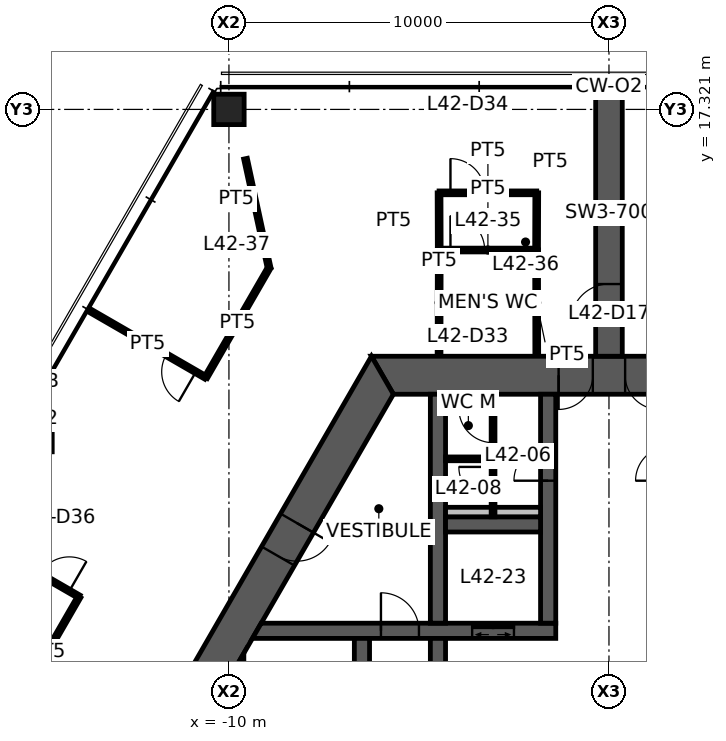
"""IFC4 building model, lengths in metres.
Left out: names, types, materials, properties, quantities, classifications, styles, units other than length and angle.
Written with IfcOpenShell. Run it as: python <this file> out.ifc"""

import sys

from ifc_helpers import new_model, si_unit, direction, frame, frame_2d, origin, origin_2d, place, context, subcontext, project, spatial, polyline, rectangle, hollow_rectangle, outline, extrude, element, fill, save


model = new_model("IFC4")
c1 = context("Model", 3, precision=1e-05, world=origin(), true_north=direction((0.0, 1.0)))
c2 = subcontext(c1, "Body", "Model", "MODEL_VIEW")
j1 = project(units=[si_unit("LENGTHUNIT", "METRE"), si_unit("PLANEANGLEUNIT", "RADIAN")], contexts=[c1])
p1 = place(None, origin())
s1 = spatial("IfcSite", under=j1, at=p1, CompositionType="ELEMENT")
p2 = place(p1, origin())
s2 = spatial("IfcBuilding", under=s1, at=p2, CompositionType="ELEMENT")
p3 = place(p2, frame((0.0, 0.0, 168.2)))
s3 = spatial("IfcBuildingStorey", under=s2, at=p3, CompositionType="ELEMENT", Elevation=168.2)
p4 = place(p3, frame((-10.0, 17.321, 0.0), z_axis=(0.0, 0.0, 1.0), x_axis=(1.0, 0.0, 0.0)))
e1 = element("IfcColumn", 1, at=p4, inside=s3, PredefinedType="COLUMN", context=c2, shape_type="SweptSolid", body=[
    extrude(hollow_rectangle(XDim=0.8, YDim=0.8, WallThickness=0.045, at=origin_2d()), origin(), (0.0, 0.0, 1.0), 3.9),
])
p5 = place(p3, frame((5.961, 10.325, 0.0), z_axis=(0.0, 0.0, 1.0), x_axis=(-1.0, 0.0, 0.0)))
e2 = element("IfcWall", 2, at=p5, inside=s3, PredefinedType="SHEAR", context=c2, shape_type="SweptSolid", body=[
    extrude(outline(polyline([(-0.289, -0.5), (4.636, -0.5), (5.536, -0.5), (6.386, -0.5), (7.286, -0.5), (12.211, -0.5), (11.634, 0.5), (7.286, 0.5), (6.386, 0.5), (5.536, 0.5), (4.636, 0.5), (0.289, 0.5), (-0.289, -0.5)])), origin(), (0.0, 0.0, 1.0), 3.9),
])
p6 = place(p5, frame((6.386, 0.0, 0.0)))
e3 = element("IfcOpeningElement", 3, at=p6, cuts=e2, PredefinedType="OPENING", context=c2, shape_type="SweptSolid", body=[
    extrude(rectangle(XDim=0.9, YDim=2.1, at=frame_2d((0.45, 1.05))), frame((0.0, 0.51, 0.0), z_axis=(0.0, -1.0, 0.0), x_axis=(1.0, 0.0, 0.0)), (0.0, 0.0, 1.0), 1.02),
])
p7 = place(p5, frame((4.636, 0.0, 0.0)))
e4 = element("IfcOpeningElement", 4, at=p7, cuts=e2, PredefinedType="OPENING", context=c2, shape_type="SweptSolid", body=[
    extrude(rectangle(XDim=0.9, YDim=2.1, at=frame_2d((0.45, 1.05))), frame((0.0, 0.51, 0.0), z_axis=(0.0, -1.0, 0.0), x_axis=(1.0, 0.0, 0.0)), (0.0, 0.0, 1.0), 1.02),
])
p8 = place(p3, frame((-5.961, 10.325, 0.0), z_axis=(0.0, 0.0, 1.0), x_axis=(-0.500004296715, -0.866022923061, 0.0)))
e5 = element("IfcWall", 5, at=p8, inside=s3, PredefinedType="SHEAR", context=c2, shape_type="SweptSolid", body=[
    extrude(outline(polyline([(-0.289, -0.5), (4.494, -0.5), (5.494, -0.5), (12.211, -0.5), (11.634, 0.5), (5.494, 0.5), (4.494, 0.5), (0.289, 0.5), (-0.289, -0.5)])), origin(), (0.0, 0.0, 1.0), 3.9),
])
p9 = place(p8, frame((4.494, 0.0, 0.0)))
e6 = element("IfcOpeningElement", 6, at=p9, cuts=e5, PredefinedType="OPENING", context=c2, shape_type="SweptSolid", body=[
    extrude(rectangle(XDim=1.0, YDim=2.1, at=frame_2d((0.5, 1.05))), frame((0.0, 0.51, 0.0), z_axis=(0.0, -1.0, 0.0), x_axis=(1.0, 0.0, 0.0)), (0.0, 0.0, 1.0), 1.02),
])
p10 = place(p3, frame((0.0, 10.825, 0.0), z_axis=(0.0, 0.0, 1.0), x_axis=(0.0, 1.0, 0.0)))
e7 = element("IfcWall", 7, at=p10, inside=s3, PredefinedType="SHEAR", context=c2, shape_type="SweptSolid", body=[
    extrude(rectangle(XDim=6.946, YDim=0.7, at=frame_2d((3.473, 0.0))), origin(), (0.0, 0.0, 1.0), 3.9),
])
p11 = place(p10, frame((0.9, 0.0, 0.0)))
e8 = element("IfcOpeningElement", 8, at=p11, cuts=e7, PredefinedType="OPENING", context=c2, shape_type="SweptSolid", body=[
    extrude(rectangle(XDim=1.0, YDim=2.1, at=frame_2d((0.5, 1.05))), frame((0.0, 0.36, 0.0), z_axis=(0.0, -1.0, 0.0), x_axis=(1.0, 0.0, 0.0)), (0.0, 0.0, 1.0), 0.72),
])
p12 = place(p3, frame((-9.266, 3.6, 0.0), z_axis=(0.0, 0.0, 1.0), x_axis=(1.0, 0.0, 0.0)))
e9 = element("IfcWall", 9, at=p12, inside=s3, PredefinedType="SHEAR", context=c2, shape_type="SweptSolid", body=[
    extrude(outline(polyline([(-0.115, -0.2), (3.266, -0.2), (4.266, -0.2), (5.667, -0.2), (6.767, -0.2), (7.866, -0.2), (7.866, 0.2), (6.767, 0.2), (5.667, 0.2), (4.266, 0.2), (3.266, 0.2), (0.115, 0.2), (-0.115, -0.2)])), origin(), (0.0, 0.0, 1.0), 3.9),
])
p13 = place(p12, frame((3.266, 0.0, 0.0)))
e10 = element("IfcOpeningElement", 10, at=p13, cuts=e9, PredefinedType="OPENING", context=c2, shape_type="SweptSolid", body=[
    extrude(rectangle(XDim=1.0, YDim=2.1, at=frame_2d((0.5, 1.05))), frame((0.0, 0.21, 0.0), z_axis=(0.0, -1.0, 0.0), x_axis=(1.0, 0.0, 0.0)), (0.0, 0.0, 1.0), 0.42),
])
p14 = place(p12, frame((5.667, 0.0, 0.0)))
e11 = element("IfcOpeningElement", 11, at=p14, cuts=e9, PredefinedType="OPENING", context=c2, shape_type="SweptSolid", body=[
    extrude(rectangle(XDim=1.1, YDim=2.1, at=frame_2d((0.55, 1.05))), frame((0.0, 0.21, 0.0), z_axis=(0.0, -1.0, 0.0), x_axis=(1.0, 0.0, 0.0)), (0.0, 0.0, 1.0), 0.42),
])
p15 = place(p3, frame((-1.6, 3.8, 0.0), z_axis=(0.0, 0.0, 1.0), x_axis=(0.0, 1.0, 0.0)))
e12 = element("IfcWall", 12, at=p15, inside=s3, PredefinedType="SHEAR", context=c2, shape_type="SweptSolid", body=[
    extrude(rectangle(XDim=6.025, YDim=0.4, at=frame_2d((3.012, 0.0))), origin(), (0.0, 0.0, 1.0), 3.9),
])
p16 = place(p15, frame((3.75, 0.0, 0.0)))
e13 = element("IfcOpeningElement", 13, at=p16, cuts=e12, PredefinedType="OPENING", context=c2, shape_type="SweptSolid", body=[
    extrude(rectangle(XDim=0.9, YDim=2.1, at=frame_2d((0.45, 1.05))), frame((0.0, 0.21, 0.0), z_axis=(0.0, -1.0, 0.0), x_axis=(1.0, 0.0, 0.0)), (0.0, 0.0, 1.0), 0.42),
])
p17 = place(p3, frame((-4.5, -3.4, 0.0), z_axis=(0.0, 0.0, 1.0), x_axis=(0.0, 1.0, 0.0)))
e14 = element("IfcWall", 14, at=p17, inside=s3, PredefinedType="SHEAR", context=c2, shape_type="SweptSolid", body=[
    extrude(rectangle(XDim=6.8, YDim=0.4, at=frame_2d((3.4, 0.0))), origin(), (0.0, 0.0, 1.0), 3.9),
])
p18 = place(p17, frame((2.9, 0.0, 0.0)))
e15 = element("IfcOpeningElement", 15, at=p18, cuts=e14, PredefinedType="OPENING", context=c2, shape_type="SweptSolid", body=[
    extrude(rectangle(XDim=1.0, YDim=2.1, at=frame_2d((0.5, 1.05))), frame((0.0, 0.21, 0.0), z_axis=(0.0, -1.0, 0.0), x_axis=(1.0, 0.0, 0.0)), (0.0, 0.0, 1.0), 0.42),
])
p19 = place(p3, frame((-6.5, -3.4, 0.0), z_axis=(0.0, 0.0, 1.0), x_axis=(0.0, 1.0, 0.0)))
e16 = element("IfcWall", 16, at=p19, inside=s3, PredefinedType="SHEAR", context=c2, shape_type="SweptSolid", body=[
    extrude(rectangle(XDim=6.8, YDim=0.4, at=frame_2d((3.4, 0.0))), origin(), (0.0, 0.0, 1.0), 3.9),
])
p20 = place(p19, frame((0.1, 0.0, 0.0)))
e17 = element("IfcOpeningElement", 17, at=p20, cuts=e16, PredefinedType="OPENING", context=c2, shape_type="SweptSolid", body=[
    extrude(rectangle(XDim=1.0, YDim=2.1, at=frame_2d((0.5, 1.05))), frame((0.0, 0.21, 0.0), z_axis=(0.0, -1.0, 0.0), x_axis=(1.0, 0.0, 0.0)), (0.0, 0.0, 1.0), 0.42),
])
p21 = place(p3, frame((-4.5, 3.8, 0.0), z_axis=(0.0, 0.0, 1.0), x_axis=(0.0, 1.0, 0.0)))
e18 = element("IfcWall", 18, at=p21, inside=s3, PredefinedType="SHEAR", context=c2, shape_type="SweptSolid", body=[
    extrude(rectangle(XDim=6.025, YDim=0.4, at=frame_2d((3.012, 0.0))), origin(), (0.0, 0.0, 1.0), 3.9),
])
p22 = place(p3, frame((-4.3, 6.4, 0.0), z_axis=(0.0, 0.0, 1.0), x_axis=(1.0, 0.0, 0.0)))
e19 = element("IfcWall", 19, at=p22, inside=s3, PredefinedType="SHEAR", context=c2, shape_type="SweptSolid", body=[
    extrude(rectangle(XDim=2.5, YDim=0.4, at=frame_2d((1.25, 0.0))), origin(), (0.0, 0.0, 1.0), 3.9),
])
p23 = place(p3, frame((-9.808, -2.662, 0.0), z_axis=(0.0, 0.0, 1.0), x_axis=(0.0, 1.0, 0.0)))
e20 = element("IfcWall", 20, at=p23, inside=s3, PredefinedType="SHEAR", context=c2, shape_type="SweptSolid", body=[
    extrude(outline(polyline([(-0.346, -0.2), (5.671, -0.2), (4.978, 0.2), (0.346, 0.2), (-0.346, -0.2)])), origin(), (0.0, 0.0, 1.0), 3.9),
])
p24 = place(p3, frame((-4.3, 6.725, 0.0), z_axis=(0.0, 0.0, 1.0), x_axis=(1.0, 0.0, 0.0)))
e21 = element("IfcWall", 21, at=p24, inside=s3, PredefinedType="PLUMBINGWALL", context=c2, shape_type="SweptSolid", body=[
    extrude(rectangle(XDim=2.5, YDim=0.25, at=frame_2d((1.25, 0.0))), origin(), (0.0, 0.0, 1.0), 3.9),
])
p25 = place(p3, frame((-3.05, 6.6, 0.0), z_axis=(0.0, 0.0, 1.0), x_axis=(0.0, 1.0, 0.0)))
e22 = element("IfcWall", 22, at=p25, inside=s3, PredefinedType="PARTITIONING", context=c2, shape_type="SweptSolid", body=[
    extrude(rectangle(XDim=3.225, YDim=0.1, at=frame_2d((1.612, 0.0))), origin(), (0.0, 0.0, 1.0), 2.95),
])
p26 = place(p25, frame((1.95, 0.0, 0.0)))
e23 = element("IfcOpeningElement", 23, at=p26, cuts=e22, PredefinedType="OPENING", context=c2, shape_type="SweptSolid", body=[
    extrude(rectangle(XDim=0.9, YDim=2.1, at=frame_2d((0.45, 1.05))), frame((0.0, 0.06, 0.0), z_axis=(0.0, -1.0, 0.0), x_axis=(1.0, 0.0, 0.0)), (0.0, 0.0, 1.0), 0.12),
])
p27 = place(p25, frame((0.413, 0.0, 0.0)))
e24 = element("IfcOpeningElement", 24, at=p27, cuts=e22, PredefinedType="OPENING", context=c2, shape_type="SweptSolid", body=[
    extrude(rectangle(XDim=0.9, YDim=2.1, at=frame_2d((0.45, 1.05))), frame((0.0, 0.06, 0.0), z_axis=(0.0, -1.0, 0.0), x_axis=(1.0, 0.0, 0.0)), (0.0, 0.0, 1.0), 0.12),
])
p28 = place(p3, frame((-3.1, 8.125, 0.0), z_axis=(0.0, 0.0, 1.0), x_axis=(-1.0, 0.0, 0.0)))
e25 = element("IfcWall", 25, at=p28, inside=s3, PredefinedType="PARTITIONING", context=c2, shape_type="SweptSolid", body=[
    extrude(rectangle(XDim=1.2, YDim=0.1, at=frame_2d((0.6, 0.0))), origin(), (0.0, 0.0, 1.0), 2.95),
])
p29 = place(p3, frame((-4.471, 13.62, 0.0), z_axis=(0.0, 0.0, 1.0), x_axis=(1.0, 0.0, 0.0)))
e26 = element("IfcWall", 26, at=p29, inside=s3, PredefinedType="PARTITIONING", context=c2, shape_type="SweptSolid", body=[
    extrude(rectangle(XDim=2.571, YDim=0.1, at=frame_2d((1.286, 0.0))), origin(), (0.0, 0.0, 1.0), 2.95),
])
p30 = place(p29, frame((0.3, 0.0, 0.0)))
e27 = element("IfcOpeningElement", 27, at=p30, cuts=e26, PredefinedType="OPENING", context=c2, shape_type="SweptSolid", body=[
    extrude(rectangle(XDim=0.9, YDim=2.1, at=frame_2d((0.45, 1.05))), frame((0.0, 0.06, 0.0), z_axis=(0.0, -1.0, 0.0), x_axis=(1.0, 0.0, 0.0)), (0.0, 0.0, 1.0), 0.12),
])
for number, where, z_axis, x_axis in (
    (28, (-4.471, 10.845, 0.0), (0.0, 0.0, 1.0), (0.002, 1.0, 0.0)),
    (29, (-1.905, 13.625, 0.0), (0.0, 0.0, 1.0), (0.002, -1.0, 0.0)),
):
    element("IfcWall", number, at=place(p3, frame(where, z_axis=z_axis, x_axis=x_axis)), inside=s3, PredefinedType="PARTITIONING", context=c2, shape_type="SweptSolid", body=[
        extrude(rectangle(XDim=2.78, YDim=0.1, at=frame_2d((1.39, 0.0))), origin(), (0.0, 0.0, 1.0), 2.95),
    ])
p31 = place(p3, frame((-4.471, 15.125, 0.0), z_axis=(0.0, 0.0, 1.0), x_axis=(1.0, 0.0, 0.0)))
e30 = element("IfcWall", 30, at=p31, inside=s3, PredefinedType="PARTITIONING", context=c2, shape_type="SweptSolid", body=[
    extrude(rectangle(XDim=2.571, YDim=0.1, at=frame_2d((1.286, 0.0))), origin(), (0.0, 0.0, 1.0), 2.95),
])
p32 = place(p31, frame((0.3, 0.0, 0.0)))
e31 = element("IfcOpeningElement", 31, at=p32, cuts=e30, PredefinedType="OPENING", context=c2, shape_type="SweptSolid", body=[
    extrude(rectangle(XDim=0.9, YDim=2.1, at=frame_2d((0.45, 1.05))), frame((0.0, 0.06, 0.0), z_axis=(0.0, -1.0, 0.0), x_axis=(1.0, 0.0, 0.0)), (0.0, 0.0, 1.0), 0.12),
])
for number, where, z_axis, x_axis in (
    (32, (-4.466, 13.625, 0.0), (0.0, 0.0, 1.0), (-0.003, 1.0, 0.0)),
    (33, (-1.9, 15.125, 0.0), (0.0, 0.0, 1.0), (-0.003, -1.0, 0.0)),
):
    element("IfcWall", number, at=place(p3, frame(where, z_axis=z_axis, x_axis=x_axis)), inside=s3, PredefinedType="PARTITIONING", context=c2, shape_type="SweptSolid", body=[
        extrude(rectangle(XDim=1.5, YDim=0.1, at=frame_2d((0.75, 0.0))), origin(), (0.0, 0.0, 1.0), 2.95),
    ])
p33 = place(p3, frame((-10.61, 10.264, 0.0), z_axis=(0.0, 0.0, 1.0), x_axis=(-0.86601282795, 0.500021781351, 0.0)))
e34 = element("IfcWall", 34, at=p33, inside=s3, PredefinedType="PARTITIONING", context=c2, shape_type="SweptSolid", body=[
    extrude(rectangle(XDim=3.53, YDim=0.1, at=frame_2d((1.765, 0.0))), origin(), (0.0, 0.0, 1.0), 2.95),
])
p34 = place(p33, frame((0.3, 0.0, 0.0)))
e35 = element("IfcOpeningElement", 35, at=p34, cuts=e34, PredefinedType="OPENING", context=c2, shape_type="SweptSolid", body=[
    extrude(rectangle(XDim=0.9, YDim=2.1, at=frame_2d((0.45, 1.05))), frame((0.0, 0.06, 0.0), z_axis=(0.0, -1.0, 0.0), x_axis=(1.0, 0.0, 0.0)), (0.0, 0.0, 1.0), 0.12),
])
p35 = place(p3, frame((-9.564, 16.024, 0.0), z_axis=(0.0, 0.0, 1.0), x_axis=(0.211116290139, -0.977460951669, 0.0)))
e36 = element("IfcWall", 36, at=p35, inside=s3, PredefinedType="PARTITIONING", context=c2, shape_type="SweptSolid", body=[
    extrude(rectangle(XDim=2.941, YDim=0.1, at=frame_2d((1.47, 0.0))), origin(), (0.0, 0.0, 1.0), 2.95),
])
p36 = place(p3, frame((-8.943, 13.149, 0.0), z_axis=(0.0, 0.0, 1.0), x_axis=(-0.500189695295, -0.86591585545, 0.0)))
e37 = element("IfcWall", 37, at=p36, inside=s3, PredefinedType="PARTITIONING", context=c2, shape_type="SweptSolid", body=[
    extrude(rectangle(XDim=3.332, YDim=0.1, at=frame_2d((1.666, 0.0))), origin(), (0.0, 0.0, 1.0), 2.95),
])
p37 = place(p3, frame((-16.976, 6.248, 0.0), z_axis=(0.0, 0.0, 1.0), x_axis=(0.866001150353, -0.500042005822, 0.0)))
e38 = element("IfcWall", 38, at=p37, inside=s3, PredefinedType="PARTITIONING", context=c2, shape_type="SweptSolid", body=[
    extrude(rectangle(XDim=3.505, YDim=0.1, at=frame_2d((1.752, 0.0))), origin(), (0.0, 0.0, 1.0), 2.95),
])
p38 = place(p37, frame((2.305, 0.0, 0.0)))
e39 = element("IfcOpeningElement", 39, at=p38, cuts=e38, PredefinedType="OPENING", context=c2, shape_type="SweptSolid", body=[
    extrude(rectangle(XDim=0.9, YDim=2.1, at=frame_2d((0.45, 1.05))), frame((0.0, 0.06, 0.0), z_axis=(0.0, -1.0, 0.0), x_axis=(1.0, 0.0, 0.0)), (0.0, 0.0, 1.0), 0.12),
])
p39 = place(p3, frame((-13.941, 4.495, 0.0), z_axis=(0.0, 0.0, 1.0), x_axis=(-0.500033344505, -0.86600615147, 0.0)))
e40 = element("IfcWall", 40, at=p39, inside=s3, PredefinedType="PARTITIONING", context=c2, shape_type="SweptSolid", body=[
    extrude(rectangle(XDim=3.331, YDim=0.1, at=frame_2d((1.666, 0.0))), origin(), (0.0, 0.0, 1.0), 2.95),
])
p40 = place(p3, frame((0.0, 17.771, 0.0), z_axis=(0.0, 0.0, 1.0), x_axis=(0.0, 1.0, 0.0)))
e41 = element("IfcWall", 41, at=p40, inside=s3, PredefinedType="PARTITIONING", context=c2, shape_type="SweptSolid", body=[
    extrude(rectangle(XDim=0.08, YDim=0.175, at=frame_2d((0.04, 0.0))), origin(), (0.0, 0.0, 1.0), 3.9),
])
p41 = place(p6, origin())
e42 = element("IfcDoor", 42, at=p41, inside=s3, OperationType="SINGLE_SWING_RIGHT", PredefinedType="DOOR", context=c2, shape_type="SweptSolid", body=[
    extrude(rectangle(XDim=0.9, YDim=2.1, at=frame_2d((0.45, 1.05))), frame((0.0, 0.025, 0.0), z_axis=(0.0, -1.0, 0.0), x_axis=(1.0, 0.0, 0.0)), (0.0, 0.0, 1.0), 0.05),
])
fill(e3, e42)
p42 = place(p7, origin())
e43 = element("IfcDoor", 43, at=p42, inside=s3, OperationType="SINGLE_SWING_LEFT", PredefinedType="DOOR", context=c2, shape_type="SweptSolid", body=[
    extrude(rectangle(XDim=0.9, YDim=2.1, at=frame_2d((0.45, 1.05))), frame((0.0, 0.025, 0.0), z_axis=(0.0, -1.0, 0.0), x_axis=(1.0, 0.0, 0.0)), (0.0, 0.0, 1.0), 0.05),
])
fill(e4, e43)
p43 = place(p9, origin())
e44 = element("IfcDoor", 44, at=p43, inside=s3, OperationType="SINGLE_SWING_LEFT", PredefinedType="DOOR", context=c2, shape_type="SweptSolid", body=[
    extrude(rectangle(XDim=1.0, YDim=2.1, at=frame_2d((0.5, 1.05))), frame((0.0, 0.025, 0.0), z_axis=(0.0, -1.0, 0.0), x_axis=(1.0, 0.0, 0.0)), (0.0, 0.0, 1.0), 0.05),
])
fill(e6, e44)
p44 = place(p13, origin())
e45 = element("IfcDoor", 45, at=p44, inside=s3, OperationType="SINGLE_SWING_LEFT", PredefinedType="DOOR", context=c2, shape_type="SweptSolid", body=[
    extrude(rectangle(XDim=1.0, YDim=2.1, at=frame_2d((0.5, 1.05))), frame((0.0, 0.025, 0.0), z_axis=(0.0, -1.0, 0.0), x_axis=(1.0, 0.0, 0.0)), (0.0, 0.0, 1.0), 0.05),
])
fill(e10, e45)
p45 = place(p16, origin())
e46 = element("IfcDoor", 46, at=p45, inside=s3, OperationType="SINGLE_SWING_LEFT", PredefinedType="DOOR", context=c2, shape_type="SweptSolid", body=[
    extrude(rectangle(XDim=0.9, YDim=2.1, at=frame_2d((0.45, 1.05))), frame((0.0, 0.025, 0.0), z_axis=(0.0, -1.0, 0.0), x_axis=(1.0, 0.0, 0.0)), (0.0, 0.0, 1.0), 0.05),
])
fill(e13, e46)
p46 = place(p11, origin())
e47 = element("IfcDoor", 47, at=p46, inside=s3, OperationType="SINGLE_SWING_LEFT", PredefinedType="DOOR", context=c2, shape_type="SweptSolid", body=[
    extrude(rectangle(XDim=1.0, YDim=2.1, at=frame_2d((0.5, 1.05))), frame((0.0, 0.025, 0.0), z_axis=(0.0, -1.0, 0.0), x_axis=(1.0, 0.0, 0.0)), (0.0, 0.0, 1.0), 0.05),
])
fill(e8, e47)
p47 = place(p26, origin())
e48 = element("IfcDoor", 48, at=p47, inside=s3, OperationType="SINGLE_SWING_RIGHT", PredefinedType="DOOR", context=c2, shape_type="SweptSolid", body=[
    extrude(rectangle(XDim=0.9, YDim=2.1, at=frame_2d((0.45, 1.05))), frame((0.0, 0.025, 0.0), z_axis=(0.0, -1.0, 0.0), x_axis=(1.0, 0.0, 0.0)), (0.0, 0.0, 1.0), 0.05),
])
fill(e23, e48)
p48 = place(p27, origin())
e49 = element("IfcDoor", 49, at=p48, inside=s3, OperationType="SINGLE_SWING_RIGHT", PredefinedType="DOOR", context=c2, shape_type="SweptSolid", body=[
    extrude(rectangle(XDim=0.9, YDim=2.1, at=frame_2d((0.45, 1.05))), frame((0.0, 0.025, 0.0), z_axis=(0.0, -1.0, 0.0), x_axis=(1.0, 0.0, 0.0)), (0.0, 0.0, 1.0), 0.05),
])
fill(e24, e49)
p49 = place(p30, origin())
e50 = element("IfcDoor", 50, at=p49, inside=s3, OperationType="SINGLE_SWING_LEFT", PredefinedType="DOOR", context=c2, shape_type="SweptSolid", body=[
    extrude(rectangle(XDim=0.9, YDim=2.1, at=frame_2d((0.45, 1.05))), frame((0.0, 0.025, 0.0), z_axis=(0.0, -1.0, 0.0), x_axis=(1.0, 0.0, 0.0)), (0.0, 0.0, 1.0), 0.05),
])
fill(e27, e50)
p50 = place(p32, origin())
e51 = element("IfcDoor", 51, at=p50, inside=s3, OperationType="SINGLE_SWING_LEFT", PredefinedType="DOOR", context=c2, shape_type="SweptSolid", body=[
    extrude(rectangle(XDim=0.9, YDim=2.1, at=frame_2d((0.45, 1.05))), frame((0.0, 0.025, 0.0), z_axis=(0.0, -1.0, 0.0), x_axis=(1.0, 0.0, 0.0)), (0.0, 0.0, 1.0), 0.05),
])
fill(e31, e51)
p51 = place(p34, origin())
e52 = element("IfcDoor", 52, at=p51, inside=s3, OperationType="SINGLE_SWING_LEFT", PredefinedType="DOOR", context=c2, shape_type="SweptSolid", body=[
    extrude(rectangle(XDim=0.9, YDim=2.1, at=frame_2d((0.45, 1.05))), frame((0.0, 0.025, 0.0), z_axis=(0.0, -1.0, 0.0), x_axis=(1.0, 0.0, 0.0)), (0.0, 0.0, 1.0), 0.05),
])
fill(e35, e52)
p52 = place(p38, origin())
e53 = element("IfcDoor", 53, at=p52, inside=s3, OperationType="SINGLE_SWING_RIGHT", PredefinedType="DOOR", context=c2, shape_type="SweptSolid", body=[
    extrude(rectangle(XDim=0.9, YDim=2.1, at=frame_2d((0.45, 1.05))), frame((0.0, 0.025, 0.0), z_axis=(0.0, -1.0, 0.0), x_axis=(1.0, 0.0, 0.0)), (0.0, 0.0, 1.0), 0.05),
])
fill(e39, e53)
p53 = place(p14, origin())
e54 = element("IfcDoor", 54, at=p53, inside=s3, OperationType="DOUBLE_DOOR_SLIDING", PredefinedType="DOOR", context=c2, shape_type="SweptSolid", body=[
    extrude(rectangle(XDim=1.1, YDim=2.1, at=frame_2d((0.55, 1.05))), frame((0.0, 0.025, 0.0), z_axis=(0.0, -1.0, 0.0), x_axis=(1.0, 0.0, 0.0)), (0.0, 0.0, 1.0), 0.05),
])
fill(e11, e54)
save(model, sys.argv[1])
